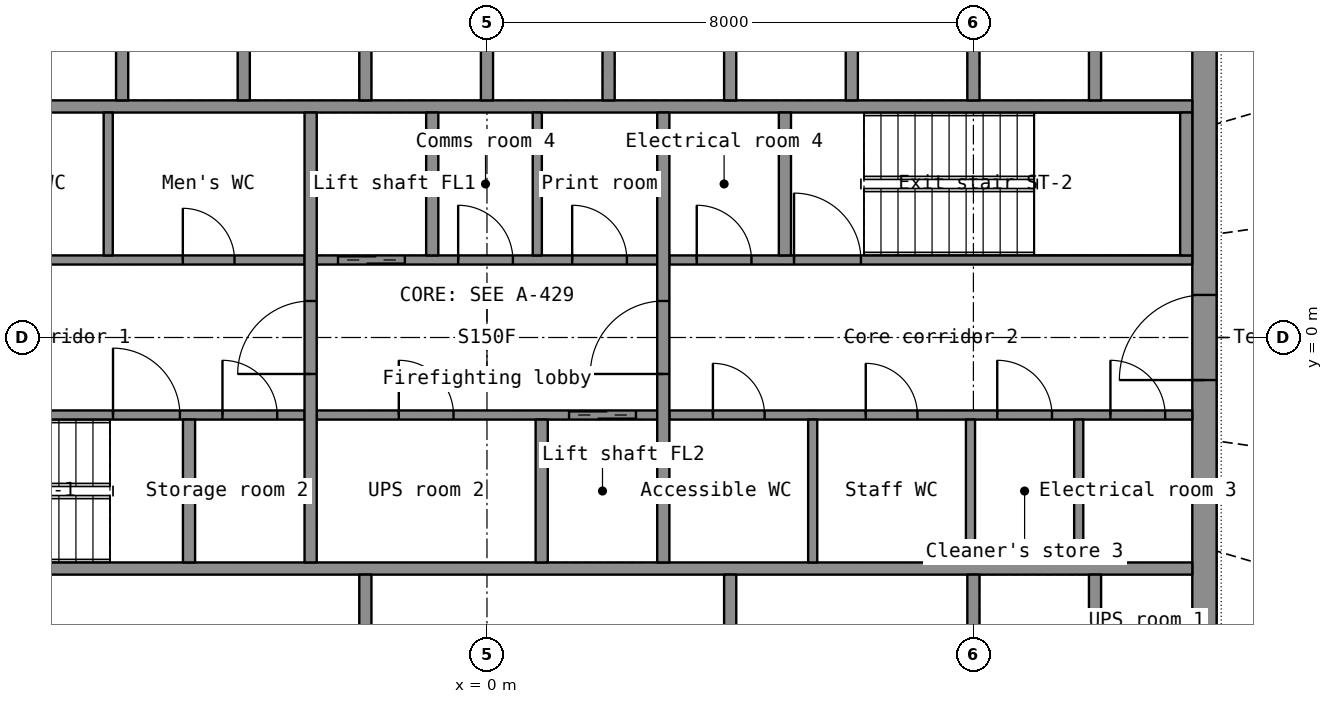
"""IFC4 building model, lengths in metres.
Left out: names, types, materials, properties, quantities, classifications, styles, units other than length and angle.
Written with IfcOpenShell. Run it as: python <this file> out.ifc"""

import sys

from ifc_helpers import new_model, si_unit, direction, frame, frame_2d, origin, place, context, subcontext, project, spatial, rectangle, extrude, element, fill, save


model = new_model("IFC4")
c1 = context("Model", 3, precision=1e-05, world=origin(), true_north=direction((0.0, 1.0)))
c2 = subcontext(c1, "Body", "Model", "MODEL_VIEW")
j1 = project(units=[si_unit("LENGTHUNIT", "METRE"), si_unit("PLANEANGLEUNIT", "RADIAN")], contexts=[c1])
p1 = place(None, origin())
s1 = spatial("IfcSite", under=j1, at=p1, CompositionType="ELEMENT")
p2 = place(p1, origin())
s2 = spatial("IfcBuilding", under=s1, at=p2, CompositionType="ELEMENT")
p3 = place(p2, frame((0.0, 0.0, 220.8)))
s3 = spatial("IfcBuildingStorey", under=s2, at=p3, CompositionType="ELEMENT", Elevation=220.8)
p4 = place(p3, frame((11.8, -7.2, 0.0), z_axis=(0.0, 0.0, 1.0), x_axis=(0.0, 1.0, 0.0)))
e1 = element("IfcWall", 1, at=p4, inside=s3, PredefinedType="SHEAR", context=c2, shape_type="SweptSolid", body=[
    extrude(rectangle(XDim=14.4, YDim=0.4, at=frame_2d((7.2, 0.0))), origin(), (0.0, 0.0, 1.0), 3.3),
])
p5 = place(p4, frame((6.5, 0.0, 0.0)))
e2 = element("IfcOpeningElement", 2, at=p5, cuts=e1, PredefinedType="OPENING", context=c2, shape_type="SweptSolid", body=[
    extrude(rectangle(XDim=1.4, YDim=2.2, at=frame_2d((0.7, 1.1))), frame((0.0, 0.21, 0.0), z_axis=(0.0, -1.0, 0.0), x_axis=(1.0, 0.0, 0.0)), (0.0, 0.0, 1.0), 0.42),
])
for number, where, z_axis, x_axis in (
    (3, (-11.6, -3.8, 0.0), (0.0, 0.0, 1.0), (1.0, 0.0, 0.0)),
    (4, (-11.6, 3.8, 0.0), (0.0, 0.0, 1.0), (1.0, 0.0, 0.0)),
):
    element("IfcWall", number, at=place(p3, frame(where, z_axis=z_axis, x_axis=x_axis)), inside=s3, PredefinedType="SHEAR", context=c2, shape_type="SweptSolid", body=[
        extrude(rectangle(XDim=23.2, YDim=0.2, at=frame_2d((11.6, 0.0))), origin(), (0.0, 0.0, 1.0), 3.3),
    ])
for number, where, z_axis, x_axis in (
    (5, (8.0, -6.8, 0.0), (0.0, 0.0, 1.0), (0.0, 1.0, 0.0)),
    (6, (10.0, -6.8, 0.0), (0.0, 0.0, 1.0), (0.0, 1.0, 0.0)),
):
    element("IfcWall", number, at=place(p3, frame(where, z_axis=z_axis, x_axis=x_axis)), inside=s3, PredefinedType="SHEAR", context=c2, shape_type="SweptSolid", body=[
        extrude(rectangle(XDim=2.9, YDim=0.2, at=frame_2d((1.45, 0.0))), origin(), (0.0, 0.0, 1.0), 3.3),
    ])
for number, where, z_axis, x_axis in (
    (7, (-2.0, -6.8, 0.0), (0.0, 0.0, 1.0), (0.0, 1.0, 0.0)),
    (8, (4.0, -6.8, 0.0), (0.0, 0.0, 1.0), (0.0, 1.0, 0.0)),
):
    element("IfcWall", number, at=place(p3, frame(where, z_axis=z_axis, x_axis=x_axis)), inside=s3, PredefinedType="PARTITIONING", context=c2, shape_type="SweptSolid", body=[
        extrude(rectangle(XDim=2.9, YDim=0.2, at=frame_2d((1.45, 0.0))), origin(), (0.0, 0.0, 1.0), 3.3),
    ])
for number, where, z_axis, x_axis in (
    (9, (-6.0, 3.9, 0.0), (0.0, 0.0, 1.0), (0.0, 1.0, 0.0)),
    (10, (-4.0, 3.9, 0.0), (0.0, 0.0, 1.0), (0.0, 1.0, 0.0)),
    (11, (-2.0, 3.9, 0.0), (0.0, 0.0, 1.0), (0.0, 1.0, 0.0)),
    (12, (0.0, 3.9, 0.0), (0.0, 0.0, 1.0), (0.0, 1.0, 0.0)),
    (13, (2.0, 3.9, 0.0), (0.0, 0.0, 1.0), (0.0, 1.0, 0.0)),
    (14, (4.0, 3.9, 0.0), (0.0, 0.0, 1.0), (0.0, 1.0, 0.0)),
    (15, (6.0, 3.9, 0.0), (0.0, 0.0, 1.0), (0.0, 1.0, 0.0)),
    (16, (8.0, 3.9, 0.0), (0.0, 0.0, 1.0), (0.0, 1.0, 0.0)),
    (17, (10.0, 3.9, 0.0), (0.0, 0.0, 1.0), (0.0, 1.0, 0.0)),
):
    element("IfcWall", number, at=place(p3, frame(where, z_axis=z_axis, x_axis=x_axis)), inside=s3, PredefinedType="SHEAR", context=c2, shape_type="SweptSolid", body=[
        extrude(rectangle(XDim=2.9, YDim=0.2, at=frame_2d((1.45, 0.0))), origin(), (0.0, 0.0, 1.0), 3.3),
    ])
p6 = place(p3, frame((-11.6, -1.275, 0.0), z_axis=(0.0, 0.0, 1.0), x_axis=(1.0, 0.0, 0.0)))
e18 = element("IfcWall", 18, at=p6, inside=s3, PredefinedType="SHEAR", context=c2, shape_type="SweptSolid", body=[
    extrude(rectangle(XDim=8.6, YDim=0.15, at=frame_2d((4.3, 0.0))), origin(), (0.0, 0.0, 1.0), 3.3),
])
p7 = place(p6, frame((5.45, 0.0, 0.0)))
e19 = element("IfcOpeningElement", 19, at=p7, cuts=e18, PredefinedType="OPENING", context=c2, shape_type="SweptSolid", body=[
    extrude(rectangle(XDim=1.1, YDim=2.15, at=frame_2d((0.55, 1.075))), frame((0.0, 0.085, 0.0), z_axis=(0.0, -1.0, 0.0), x_axis=(1.0, 0.0, 0.0)), (0.0, 0.0, 1.0), 0.17),
])
p8 = place(p6, frame((7.25, 0.0, 0.0)))
e20 = element("IfcOpeningElement", 20, at=p8, cuts=e18, PredefinedType="OPENING", context=c2, shape_type="SweptSolid", body=[
    extrude(rectangle(XDim=0.9, YDim=2.1, at=frame_2d((0.45, 1.05))), frame((0.0, 0.085, 0.0), z_axis=(0.0, -1.0, 0.0), x_axis=(1.0, 0.0, 0.0)), (0.0, 0.0, 1.0), 0.17),
])
p9 = place(p3, frame((-2.8, -1.275, 0.0), z_axis=(0.0, 0.0, 1.0), x_axis=(1.0, 0.0, 0.0)))
e21 = element("IfcWall", 21, at=p9, inside=s3, PredefinedType="SHEAR", context=c2, shape_type="SweptSolid", body=[
    extrude(rectangle(XDim=5.6, YDim=0.15, at=frame_2d((2.8, 0.0))), origin(), (0.0, 0.0, 1.0), 3.3),
])
p10 = place(p9, frame((4.15, 0.0, 0.0)))
e22 = element("IfcOpeningElement", 22, at=p10, cuts=e21, PredefinedType="OPENING", context=c2, shape_type="SweptSolid", body=[
    extrude(rectangle(XDim=1.1, YDim=2.2, at=frame_2d((0.55, 1.1))), frame((0.0, 0.085, 0.0), z_axis=(0.0, -1.0, 0.0), x_axis=(1.0, 0.0, 0.0)), (0.0, 0.0, 1.0), 0.17),
])
p11 = place(p9, frame((1.35, 0.0, 0.0)))
e23 = element("IfcOpeningElement", 23, at=p11, cuts=e21, PredefinedType="OPENING", context=c2, shape_type="SweptSolid", body=[
    extrude(rectangle(XDim=0.9, YDim=2.1, at=frame_2d((0.45, 1.05))), frame((0.0, 0.085, 0.0), z_axis=(0.0, -1.0, 0.0), x_axis=(1.0, 0.0, 0.0)), (0.0, 0.0, 1.0), 0.17),
])
p12 = place(p3, frame((3.0, -1.275, 0.0), z_axis=(0.0, 0.0, 1.0), x_axis=(1.0, 0.0, 0.0)))
e24 = element("IfcWall", 24, at=p12, inside=s3, PredefinedType="PARTITIONING", context=c2, shape_type="SweptSolid", body=[
    extrude(rectangle(XDim=8.6, YDim=0.15, at=frame_2d((4.3, 0.0))), origin(), (0.0, 0.0, 1.0), 3.3),
])
p13 = place(p12, frame((0.716, 0.0, 0.0)))
e25 = element("IfcOpeningElement", 25, at=p13, cuts=e24, PredefinedType="OPENING", context=c2, shape_type="SweptSolid", body=[
    extrude(rectangle(XDim=0.85, YDim=2.1, at=frame_2d((0.425, 1.05))), frame((0.0, 0.085, 0.0), z_axis=(0.0, -1.0, 0.0), x_axis=(1.0, 0.0, 0.0)), (0.0, 0.0, 1.0), 0.17),
])
p14 = place(p12, frame((3.229, 0.0, 0.0)))
e26 = element("IfcOpeningElement", 26, at=p14, cuts=e24, PredefinedType="OPENING", context=c2, shape_type="SweptSolid", body=[
    extrude(rectangle(XDim=0.85, YDim=2.1, at=frame_2d((0.425, 1.05))), frame((0.0, 0.085, 0.0), z_axis=(0.0, -1.0, 0.0), x_axis=(1.0, 0.0, 0.0)), (0.0, 0.0, 1.0), 0.17),
])
p15 = place(p12, frame((5.392, 0.0, 0.0)))
e27 = element("IfcOpeningElement", 27, at=p15, cuts=e24, PredefinedType="OPENING", context=c2, shape_type="SweptSolid", body=[
    extrude(rectangle(XDim=0.9, YDim=2.1, at=frame_2d((0.45, 1.05))), frame((0.0, 0.085, 0.0), z_axis=(0.0, -1.0, 0.0), x_axis=(1.0, 0.0, 0.0)), (0.0, 0.0, 1.0), 0.17),
])
p16 = place(p12, frame((7.253, 0.0, 0.0)))
e28 = element("IfcOpeningElement", 28, at=p16, cuts=e24, PredefinedType="OPENING", context=c2, shape_type="SweptSolid", body=[
    extrude(rectangle(XDim=0.9, YDim=2.1, at=frame_2d((0.45, 1.05))), frame((0.0, 0.085, 0.0), z_axis=(0.0, -1.0, 0.0), x_axis=(1.0, 0.0, 0.0)), (0.0, 0.0, 1.0), 0.17),
])
p17 = place(p3, frame((-11.6, 1.275, 0.0), z_axis=(0.0, 0.0, 1.0), x_axis=(1.0, 0.0, 0.0)))
e29 = element("IfcWall", 29, at=p17, inside=s3, PredefinedType="PARTITIONING", context=c2, shape_type="SweptSolid", body=[
    extrude(rectangle(XDim=8.6, YDim=0.15, at=frame_2d((4.3, 0.0))), origin(), (0.0, 0.0, 1.0), 3.3),
])
p18 = place(p17, frame((0.546, 0.0, 0.0)))
e30 = element("IfcOpeningElement", 30, at=p18, cuts=e29, PredefinedType="OPENING", context=c2, shape_type="SweptSolid", body=[
    extrude(rectangle(XDim=0.9, YDim=2.1, at=frame_2d((0.45, 1.05))), frame((0.0, 0.085, 0.0), z_axis=(0.0, -1.0, 0.0), x_axis=(1.0, 0.0, 0.0)), (0.0, 0.0, 1.0), 0.17),
])
p19 = place(p17, frame((3.294, 0.0, 0.0)))
e31 = element("IfcOpeningElement", 31, at=p19, cuts=e29, PredefinedType="OPENING", context=c2, shape_type="SweptSolid", body=[
    extrude(rectangle(XDim=0.85, YDim=2.1, at=frame_2d((0.425, 1.05))), frame((0.0, 0.085, 0.0), z_axis=(0.0, -1.0, 0.0), x_axis=(1.0, 0.0, 0.0)), (0.0, 0.0, 1.0), 0.17),
])
p20 = place(p17, frame((6.598, 0.0, 0.0)))
e32 = element("IfcOpeningElement", 32, at=p20, cuts=e29, PredefinedType="OPENING", context=c2, shape_type="SweptSolid", body=[
    extrude(rectangle(XDim=0.85, YDim=2.1, at=frame_2d((0.425, 1.05))), frame((0.0, 0.085, 0.0), z_axis=(0.0, -1.0, 0.0), x_axis=(1.0, 0.0, 0.0)), (0.0, 0.0, 1.0), 0.17),
])
p21 = place(p3, frame((-2.8, 1.275, 0.0), z_axis=(0.0, 0.0, 1.0), x_axis=(1.0, 0.0, 0.0)))
e33 = element("IfcWall", 33, at=p21, inside=s3, PredefinedType="SHEAR", context=c2, shape_type="SweptSolid", body=[
    extrude(rectangle(XDim=5.6, YDim=0.15, at=frame_2d((2.8, 0.0))), origin(), (0.0, 0.0, 1.0), 3.3),
])
p22 = place(p21, frame((0.35, 0.0, 0.0)))
e34 = element("IfcOpeningElement", 34, at=p22, cuts=e33, PredefinedType="OPENING", context=c2, shape_type="SweptSolid", body=[
    extrude(rectangle(XDim=1.1, YDim=2.2, at=frame_2d((0.55, 1.1))), frame((0.0, 0.085, 0.0), z_axis=(0.0, -1.0, 0.0), x_axis=(1.0, 0.0, 0.0)), (0.0, 0.0, 1.0), 0.17),
])
p23 = place(p21, frame((2.326, 0.0, 0.0)))
e35 = element("IfcOpeningElement", 35, at=p23, cuts=e33, PredefinedType="OPENING", context=c2, shape_type="SweptSolid", body=[
    extrude(rectangle(XDim=0.9, YDim=2.1, at=frame_2d((0.45, 1.05))), frame((0.0, 0.085, 0.0), z_axis=(0.0, -1.0, 0.0), x_axis=(1.0, 0.0, 0.0)), (0.0, 0.0, 1.0), 0.17),
])
p24 = place(p21, frame((4.201, 0.0, 0.0)))
e36 = element("IfcOpeningElement", 36, at=p24, cuts=e33, PredefinedType="OPENING", context=c2, shape_type="SweptSolid", body=[
    extrude(rectangle(XDim=0.9, YDim=2.1, at=frame_2d((0.45, 1.05))), frame((0.0, 0.085, 0.0), z_axis=(0.0, -1.0, 0.0), x_axis=(1.0, 0.0, 0.0)), (0.0, 0.0, 1.0), 0.17),
])
p25 = place(p3, frame((3.0, 1.275, 0.0), z_axis=(0.0, 0.0, 1.0), x_axis=(1.0, 0.0, 0.0)))
e37 = element("IfcWall", 37, at=p25, inside=s3, PredefinedType="SHEAR", context=c2, shape_type="SweptSolid", body=[
    extrude(rectangle(XDim=8.6, YDim=0.15, at=frame_2d((4.3, 0.0))), origin(), (0.0, 0.0, 1.0), 3.3),
])
p26 = place(p25, frame((2.05, 0.0, 0.0)))
e38 = element("IfcOpeningElement", 38, at=p26, cuts=e37, PredefinedType="OPENING", context=c2, shape_type="SweptSolid", body=[
    extrude(rectangle(XDim=1.1, YDim=2.15, at=frame_2d((0.55, 1.075))), frame((0.0, 0.085, 0.0), z_axis=(0.0, -1.0, 0.0), x_axis=(1.0, 0.0, 0.0)), (0.0, 0.0, 1.0), 0.17),
])
p27 = place(p25, frame((0.45, 0.0, 0.0)))
e39 = element("IfcOpeningElement", 39, at=p27, cuts=e37, PredefinedType="OPENING", context=c2, shape_type="SweptSolid", body=[
    extrude(rectangle(XDim=0.9, YDim=2.1, at=frame_2d((0.45, 1.05))), frame((0.0, 0.085, 0.0), z_axis=(0.0, -1.0, 0.0), x_axis=(1.0, 0.0, 0.0)), (0.0, 0.0, 1.0), 0.17),
])
p28 = place(p3, frame((-2.9, -3.7, 0.0), z_axis=(0.0, 0.0, 1.0), x_axis=(0.0, 1.0, 0.0)))
e40 = element("IfcWall", 40, at=p28, inside=s3, PredefinedType="SHEAR", context=c2, shape_type="SweptSolid", body=[
    extrude(rectangle(XDim=7.4, YDim=0.2, at=frame_2d((3.7, 0.0))), origin(), (0.0, 0.0, 1.0), 3.3),
])
p29 = place(p28, frame((3.1, 0.0, 0.0)))
e41 = element("IfcOpeningElement", 41, at=p29, cuts=e40, PredefinedType="OPENING", context=c2, shape_type="SweptSolid", body=[
    extrude(rectangle(XDim=1.2, YDim=2.2, at=frame_2d((0.6, 1.1))), frame((0.0, 0.11, 0.0), z_axis=(0.0, -1.0, 0.0), x_axis=(1.0, 0.0, 0.0)), (0.0, 0.0, 1.0), 0.22),
])
p30 = place(p3, frame((2.9, -3.7, 0.0), z_axis=(0.0, 0.0, 1.0), x_axis=(0.0, 1.0, 0.0)))
e42 = element("IfcWall", 42, at=p30, inside=s3, PredefinedType="SHEAR", context=c2, shape_type="SweptSolid", body=[
    extrude(rectangle(XDim=7.4, YDim=0.2, at=frame_2d((3.7, 0.0))), origin(), (0.0, 0.0, 1.0), 3.3),
])
p31 = place(p30, frame((3.1, 0.0, 0.0)))
e43 = element("IfcOpeningElement", 43, at=p31, cuts=e42, PredefinedType="OPENING", context=c2, shape_type="SweptSolid", body=[
    extrude(rectangle(XDim=1.2, YDim=2.2, at=frame_2d((0.6, 1.1))), frame((0.0, 0.11, 0.0), z_axis=(0.0, -1.0, 0.0), x_axis=(1.0, 0.0, 0.0)), (0.0, 0.0, 1.0), 0.22),
])
for number, where, z_axis, x_axis in (
    (44, (-0.9, 1.35, 0.0), (0.0, 0.0, 1.0), (0.0, 1.0, 0.0)),
    (45, (0.9, -3.7, 0.0), (0.0, 0.0, 1.0), (0.0, 1.0, 0.0)),
    (46, (11.5, 1.35, 0.0), (0.0, 0.0, 1.0), (0.0, 1.0, 0.0)),
    (47, (-4.9, -3.7, 0.0), (0.0, 0.0, 1.0), (0.0, 1.0, 0.0)),
    (48, (4.9, 1.35, 0.0), (0.0, 0.0, 1.0), (0.0, 1.0, 0.0)),
):
    element("IfcWall", number, at=place(p3, frame(where, z_axis=z_axis, x_axis=x_axis)), inside=s3, PredefinedType="SHEAR", context=c2, shape_type="SweptSolid", body=[
        extrude(rectangle(XDim=2.35, YDim=0.2, at=frame_2d((1.175, 0.0))), origin(), (0.0, 0.0, 1.0), 3.3),
    ])
for number, where, z_axis, x_axis in (
    (49, (-6.229, 1.35, 0.0), (0.0, 0.0, 1.0), (0.0, 1.0, 0.0)),
    (50, (5.357, -3.7, 0.0), (0.0, 0.0, 1.0), (0.0, 1.0, 0.0)),
    (51, (7.952, -3.7, 0.0), (0.0, 0.0, 1.0), (0.0, 1.0, 0.0)),
    (52, (9.732, -3.7, 0.0), (0.0, 0.0, 1.0), (0.0, 1.0, 0.0)),
    (53, (0.827, 1.35, 0.0), (0.0, 0.0, 1.0), (0.0, 1.0, 0.0)),
):
    element("IfcWall", number, at=place(p3, frame(where, z_axis=z_axis, x_axis=x_axis)), inside=s3, PredefinedType="PARTITIONING", context=c2, shape_type="SweptSolid", body=[
        extrude(rectangle(XDim=2.35, YDim=0.15, at=frame_2d((1.175, 0.0))), origin(), (0.0, 0.0, 1.0), 3.3),
    ])
p32 = place(p5, origin())
e54 = element("IfcDoor", 54, at=p32, inside=s3, OperationType="DOUBLE_DOOR_SINGLE_SWING", PredefinedType="DOOR", context=c2, shape_type="SweptSolid", body=[
    extrude(rectangle(XDim=1.4, YDim=2.2, at=frame_2d((0.7, 1.1))), frame((0.0, 0.025, 0.0), z_axis=(0.0, -1.0, 0.0), x_axis=(1.0, 0.0, 0.0)), (0.0, 0.0, 1.0), 0.05),
])
fill(e2, e54)
p33 = place(p29, origin())
e55 = element("IfcDoor", 55, at=p33, inside=s3, OperationType="SINGLE_SWING_LEFT", PredefinedType="DOOR", context=c2, shape_type="SweptSolid", body=[
    extrude(rectangle(XDim=1.2, YDim=2.2, at=frame_2d((0.6, 1.1))), frame((0.0, 0.025, 0.0), z_axis=(0.0, -1.0, 0.0), x_axis=(1.0, 0.0, 0.0)), (0.0, 0.0, 1.0), 0.05),
])
fill(e41, e55)
p34 = place(p31, origin())
e56 = element("IfcDoor", 56, at=p34, inside=s3, OperationType="SINGLE_SWING_LEFT", PredefinedType="DOOR", context=c2, shape_type="SweptSolid", body=[
    extrude(rectangle(XDim=1.2, YDim=2.2, at=frame_2d((0.6, 1.1))), frame((0.0, 0.025, 0.0), z_axis=(0.0, -1.0, 0.0), x_axis=(1.0, 0.0, 0.0)), (0.0, 0.0, 1.0), 0.05),
])
fill(e43, e56)
p35 = place(p22, origin())
e57 = element("IfcDoor", 57, at=p35, inside=s3, OperationType="DOUBLE_DOOR_SLIDING", PredefinedType="DOOR", context=c2, shape_type="SweptSolid", body=[
    extrude(rectangle(XDim=1.1, YDim=2.2, at=frame_2d((0.55, 1.1))), frame((0.0, 0.025, 0.0), z_axis=(0.0, -1.0, 0.0), x_axis=(1.0, 0.0, 0.0)), (0.0, 0.0, 1.0), 0.05),
])
fill(e34, e57)
p36 = place(p10, origin())
e58 = element("IfcDoor", 58, at=p36, inside=s3, OperationType="DOUBLE_DOOR_SLIDING", PredefinedType="DOOR", context=c2, shape_type="SweptSolid", body=[
    extrude(rectangle(XDim=1.1, YDim=2.2, at=frame_2d((0.55, 1.1))), frame((0.0, 0.025, 0.0), z_axis=(0.0, -1.0, 0.0), x_axis=(1.0, 0.0, 0.0)), (0.0, 0.0, 1.0), 0.05),
])
fill(e22, e58)
p37 = place(p7, origin())
e59 = element("IfcDoor", 59, at=p37, inside=s3, OperationType="SINGLE_SWING_LEFT", PredefinedType="DOOR", context=c2, shape_type="SweptSolid", body=[
    extrude(rectangle(XDim=1.1, YDim=2.15, at=frame_2d((0.55, 1.075))), frame((0.0, 0.025, 0.0), z_axis=(0.0, -1.0, 0.0), x_axis=(1.0, 0.0, 0.0)), (0.0, 0.0, 1.0), 0.05),
])
fill(e19, e59)
p38 = place(p26, origin())
e60 = element("IfcDoor", 60, at=p38, inside=s3, OperationType="SINGLE_SWING_LEFT", PredefinedType="DOOR", context=c2, shape_type="SweptSolid", body=[
    extrude(rectangle(XDim=1.1, YDim=2.15, at=frame_2d((0.55, 1.075))), frame((0.0, 0.025, 0.0), z_axis=(0.0, -1.0, 0.0), x_axis=(1.0, 0.0, 0.0)), (0.0, 0.0, 1.0), 0.05),
])
fill(e38, e60)
p39 = place(p20, origin())
e61 = element("IfcDoor", 61, at=p39, inside=s3, OperationType="SINGLE_SWING_LEFT", PredefinedType="DOOR", context=c2, shape_type="SweptSolid", body=[
    extrude(rectangle(XDim=0.85, YDim=2.1, at=frame_2d((0.425, 1.05))), frame((0.0, 0.025, 0.0), z_axis=(0.0, -1.0, 0.0), x_axis=(1.0, 0.0, 0.0)), (0.0, 0.0, 1.0), 0.05),
])
fill(e32, e61)
p40 = place(p13, origin())
e62 = element("IfcDoor", 62, at=p40, inside=s3, OperationType="SINGLE_SWING_LEFT", PredefinedType="DOOR", context=c2, shape_type="SweptSolid", body=[
    extrude(rectangle(XDim=0.85, YDim=2.1, at=frame_2d((0.425, 1.05))), frame((0.0, 0.025, 0.0), z_axis=(0.0, -1.0, 0.0), x_axis=(1.0, 0.0, 0.0)), (0.0, 0.0, 1.0), 0.05),
])
fill(e25, e62)
p41 = place(p14, origin())
e63 = element("IfcDoor", 63, at=p41, inside=s3, OperationType="SINGLE_SWING_LEFT", PredefinedType="DOOR", context=c2, shape_type="SweptSolid", body=[
    extrude(rectangle(XDim=0.85, YDim=2.1, at=frame_2d((0.425, 1.05))), frame((0.0, 0.025, 0.0), z_axis=(0.0, -1.0, 0.0), x_axis=(1.0, 0.0, 0.0)), (0.0, 0.0, 1.0), 0.05),
])
fill(e26, e63)
p42 = place(p15, origin())
e64 = element("IfcDoor", 64, at=p42, inside=s3, OperationType="SINGLE_SWING_LEFT", PredefinedType="DOOR", context=c2, shape_type="SweptSolid", body=[
    extrude(rectangle(XDim=0.9, YDim=2.1, at=frame_2d((0.45, 1.05))), frame((0.0, 0.025, 0.0), z_axis=(0.0, -1.0, 0.0), x_axis=(1.0, 0.0, 0.0)), (0.0, 0.0, 1.0), 0.05),
])
fill(e27, e64)
p43 = place(p16, origin())
e65 = element("IfcDoor", 65, at=p43, inside=s3, OperationType="SINGLE_SWING_LEFT", PredefinedType="DOOR", context=c2, shape_type="SweptSolid", body=[
    extrude(rectangle(XDim=0.9, YDim=2.1, at=frame_2d((0.45, 1.05))), frame((0.0, 0.025, 0.0), z_axis=(0.0, -1.0, 0.0), x_axis=(1.0, 0.0, 0.0)), (0.0, 0.0, 1.0), 0.05),
])
fill(e28, e65)
p44 = place(p23, origin())
e66 = element("IfcDoor", 66, at=p44, inside=s3, OperationType="SINGLE_SWING_LEFT", PredefinedType="DOOR", context=c2, shape_type="SweptSolid", body=[
    extrude(rectangle(XDim=0.9, YDim=2.1, at=frame_2d((0.45, 1.05))), frame((0.0, 0.025, 0.0), z_axis=(0.0, -1.0, 0.0), x_axis=(1.0, 0.0, 0.0)), (0.0, 0.0, 1.0), 0.05),
])
fill(e35, e66)
p45 = place(p24, origin())
e67 = element("IfcDoor", 67, at=p45, inside=s3, OperationType="SINGLE_SWING_LEFT", PredefinedType="DOOR", context=c2, shape_type="SweptSolid", body=[
    extrude(rectangle(XDim=0.9, YDim=2.1, at=frame_2d((0.45, 1.05))), frame((0.0, 0.025, 0.0), z_axis=(0.0, -1.0, 0.0), x_axis=(1.0, 0.0, 0.0)), (0.0, 0.0, 1.0), 0.05),
])
fill(e36, e67)
p46 = place(p11, origin())
e68 = element("IfcDoor", 68, at=p46, inside=s3, OperationType="SINGLE_SWING_LEFT", PredefinedType="DOOR", context=c2, shape_type="SweptSolid", body=[
    extrude(rectangle(XDim=0.9, YDim=2.1, at=frame_2d((0.45, 1.05))), frame((0.0, 0.025, 0.0), z_axis=(0.0, -1.0, 0.0), x_axis=(1.0, 0.0, 0.0)), (0.0, 0.0, 1.0), 0.05),
])
fill(e23, e68)
p47 = place(p27, origin())
e69 = element("IfcDoor", 69, at=p47, inside=s3, OperationType="SINGLE_SWING_LEFT", PredefinedType="DOOR", context=c2, shape_type="SweptSolid", body=[
    extrude(rectangle(XDim=0.9, YDim=2.1, at=frame_2d((0.45, 1.05))), frame((0.0, 0.025, 0.0), z_axis=(0.0, -1.0, 0.0), x_axis=(1.0, 0.0, 0.0)), (0.0, 0.0, 1.0), 0.05),
])
fill(e39, e69)
p48 = place(p8, origin())
e70 = element("IfcDoor", 70, at=p48, inside=s3, OperationType="SINGLE_SWING_LEFT", PredefinedType="DOOR", context=c2, shape_type="SweptSolid", body=[
    extrude(rectangle(XDim=0.9, YDim=2.1, at=frame_2d((0.45, 1.05))), frame((0.0, 0.025, 0.0), z_axis=(0.0, -1.0, 0.0), x_axis=(1.0, 0.0, 0.0)), (0.0, 0.0, 1.0), 0.05),
])
fill(e20, e70)
save(model, sys.argv[1])
